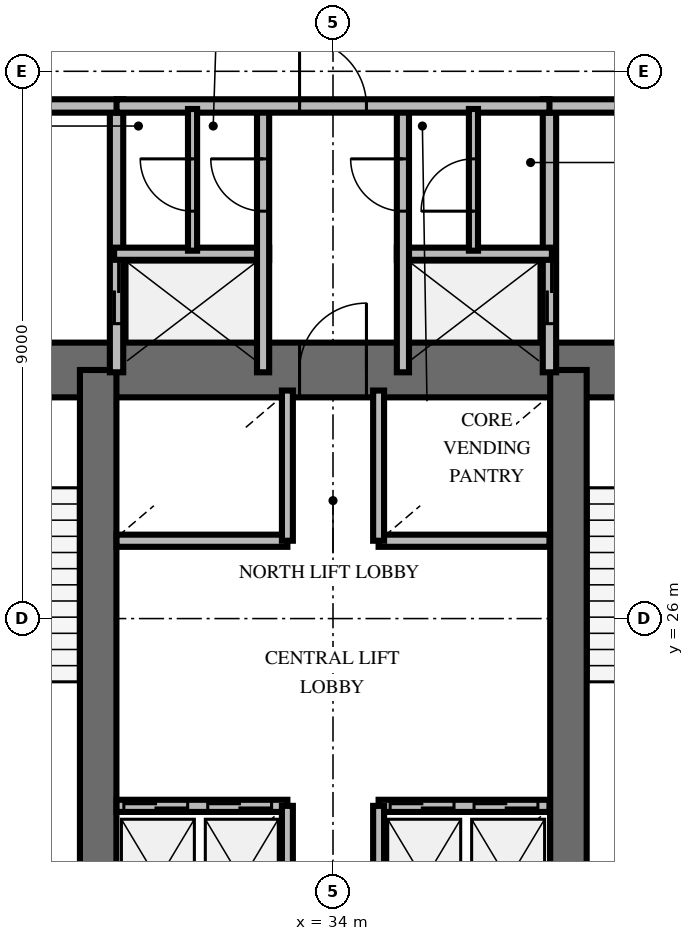
"""IFC4 building model, lengths in metres.
Left out: names, types, materials, properties, quantities, classifications, styles, units other than length and angle.
Written with IfcOpenShell. Run it as: python <this file> out.ifc"""

import sys

from ifc_helpers import new_model, si_unit, direction, frame, frame_2d, origin, place, context, subcontext, project, spatial, rectangle, extrude, element, fill, save


model = new_model("IFC4")
c1 = context("Model", 3, precision=1e-05, world=origin(), true_north=direction((0.0, 1.0)))
c2 = subcontext(c1, "Body", "Model", "MODEL_VIEW")
j1 = project(units=[si_unit("LENGTHUNIT", "METRE"), si_unit("PLANEANGLEUNIT", "RADIAN")], contexts=[c1])
p1 = place(None, origin())
s1 = spatial("IfcSite", under=j1, at=p1, CompositionType="ELEMENT")
p2 = place(p1, origin())
s2 = spatial("IfcBuilding", under=s1, at=p2, CompositionType="ELEMENT")
p3 = place(p2, frame((0.0, 0.0, 59.4)))
s3 = spatial("IfcBuildingStorey", under=s2, at=p3, CompositionType="ELEMENT", Elevation=59.4)
p4 = place(p3, frame((25.922, 30.088, 0.0), z_axis=(0.0, 0.0, 1.0), x_axis=(1.0, 0.0, 0.0)))
e1 = element("IfcWall", 1, at=p4, inside=s3, PredefinedType="SHEAR", context=c2, shape_type="SweptSolid", body=[
    extrude(rectangle(XDim=16.166, YDim=0.9, at=frame_2d((8.083, 0.0))), origin(), (0.0, 0.0, 1.0), 4.2),
])
p5 = place(p4, frame((1.028, 0.0, 0.0)))
e2 = element("IfcOpeningElement", 2, at=p5, cuts=e1, PredefinedType="OPENING", context=c2, shape_type="SweptSolid", body=[
    extrude(rectangle(XDim=1.05, YDim=2.15, at=frame_2d((0.525, 1.075))), frame((0.0, 0.46, 0.0), z_axis=(0.0, -1.0, 0.0), x_axis=(1.0, 0.0, 0.0)), (0.0, 0.0, 1.0), 0.92),
])
p6 = place(p4, frame((14.078, 0.0, 0.0)))
e3 = element("IfcOpeningElement", 3, at=p6, cuts=e1, PredefinedType="OPENING", context=c2, shape_type="SweptSolid", body=[
    extrude(rectangle(XDim=1.05, YDim=2.15, at=frame_2d((0.525, 1.075))), frame((0.0, 0.46, 0.0), z_axis=(0.0, -1.0, 0.0), x_axis=(1.0, 0.0, 0.0)), (0.0, 0.0, 1.0), 0.92),
])
p7 = place(p4, frame((7.528, 0.0, 0.0)))
e4 = element("IfcOpeningElement", 4, at=p7, cuts=e1, PredefinedType="OPENING", context=c2, shape_type="SweptSolid", body=[
    extrude(rectangle(XDim=1.1, YDim=2.15, at=frame_2d((0.55, 1.075))), frame((0.0, 0.46, 0.0), z_axis=(0.0, -1.0, 0.0), x_axis=(1.0, 0.0, 0.0)), (0.0, 0.0, 1.0), 0.92),
])
for number, where, z_axis, x_axis in (
    (5, (30.138, 20.112, 0.0), (0.0, 0.0, 1.0), (0.0, 1.0, 0.0)),
    (6, (37.872, 20.112, 0.0), (0.0, 0.0, 1.0), (0.0, 1.0, 0.0)),
):
    element("IfcWall", number, at=place(p3, frame(where, z_axis=z_axis, x_axis=x_axis)), inside=s3, PredefinedType="SHEAR", context=c2, shape_type="SweptSolid", body=[
        extrude(rectangle(XDim=9.976, YDim=0.6, at=frame_2d((4.988, 0.0))), origin(), (0.0, 0.0, 1.0), 4.2),
    ])
p8 = place(p3, frame((30.44, 30.05, 0.0), z_axis=(0.0, 0.0, 1.0), x_axis=(0.0, 1.0, 0.0)))
e7 = element("IfcWall", 7, at=p8, inside=s3, PredefinedType="SOLIDWALL", context=c2, shape_type="SweptSolid", body=[
    extrude(rectangle(XDim=4.38, YDim=0.22, at=frame_2d((2.19, 0.0))), origin(), (0.0, 0.0, 1.0), 3.0),
])
p9 = place(p8, frame((0.8, 0.0, 0.0)))
e8 = element("IfcOpeningElement", 8, at=p9, cuts=e7, PredefinedType="OPENING", context=c2, shape_type="SweptSolid", body=[
    extrude(rectangle(XDim=1.05, YDim=2.1, at=frame_2d((0.525, 1.05))), frame((0.0, 0.12, 0.0), z_axis=(0.0, -1.0, 0.0), x_axis=(1.0, 0.0, 0.0)), (0.0, 0.0, 1.0), 0.24),
])
p10 = place(p3, frame((26.24, 34.43, 0.0), z_axis=(0.0, 0.0, 1.0), x_axis=(1.0, 0.0, 0.0)))
e9 = element("IfcWall", 9, at=p10, inside=s3, PredefinedType="SOLIDWALL", context=c2, shape_type="SweptSolid", body=[
    extrude(rectangle(XDim=4.31, YDim=0.22, at=frame_2d((2.155, 0.0))), origin(), (0.0, 0.0, 1.0), 3.0),
])
p11 = place(p10, frame((1.6, 0.0, 0.0)))
e10 = element("IfcOpeningElement", 10, at=p11, cuts=e9, PredefinedType="OPENING", context=c2, shape_type="SweptSolid", body=[
    extrude(rectangle(XDim=1.1, YDim=2.15, at=frame_2d((0.55, 1.075))), frame((0.0, 0.12, 0.0), z_axis=(0.0, -1.0, 0.0), x_axis=(1.0, 0.0, 0.0)), (0.0, 0.0, 1.0), 0.24),
])
p12 = place(p3, frame((30.4, 32.0, 0.0), z_axis=(0.0, 0.0, 1.0), x_axis=(1.0, 0.0, 0.0)))
e11 = element("IfcWall", 11, at=p12, inside=s3, PredefinedType="SOLIDWALL", context=c2, shape_type="SweptSolid", body=[
    extrude(rectangle(XDim=2.55, YDim=0.2, at=frame_2d((1.275, 0.0))), origin(), (0.0, 0.0, 1.0), 3.0),
])
p13 = place(p3, frame((32.85, 30.05, 0.0), z_axis=(0.0, 0.0, 1.0), x_axis=(0.0, 1.0, 0.0)))
e12 = element("IfcWall", 12, at=p13, inside=s3, PredefinedType="SOLIDWALL", context=c2, shape_type="SweptSolid", body=[
    extrude(rectangle(XDim=4.38, YDim=0.2, at=frame_2d((2.19, 0.0))), origin(), (0.0, 0.0, 1.0), 3.0),
])
p14 = place(p13, frame((2.65, 0.0, 0.0)))
e13 = element("IfcOpeningElement", 13, at=p14, cuts=e12, PredefinedType="OPENING", context=c2, shape_type="SweptSolid", body=[
    extrude(rectangle(XDim=0.86, YDim=2.05, at=frame_2d((0.43, 1.025))), frame((0.0, 0.11, 0.0), z_axis=(0.0, -1.0, 0.0), x_axis=(1.0, 0.0, 0.0)), (0.0, 0.0, 1.0), 0.22),
])
p15 = place(p3, frame((37.56, 30.05, 0.0), z_axis=(0.0, 0.0, 1.0), x_axis=(0.0, 1.0, 0.0)))
e14 = element("IfcWall", 14, at=p15, inside=s3, PredefinedType="SOLIDWALL", context=c2, shape_type="SweptSolid", body=[
    extrude(rectangle(XDim=4.38, YDim=0.22, at=frame_2d((2.19, 0.0))), origin(), (0.0, 0.0, 1.0), 3.0),
])
p16 = place(p15, frame((0.8, 0.0, 0.0)))
e15 = element("IfcOpeningElement", 15, at=p16, cuts=e14, PredefinedType="OPENING", context=c2, shape_type="SweptSolid", body=[
    extrude(rectangle(XDim=1.05, YDim=2.1, at=frame_2d((0.525, 1.05))), frame((0.0, 0.12, 0.0), z_axis=(0.0, -1.0, 0.0), x_axis=(1.0, 0.0, 0.0)), (0.0, 0.0, 1.0), 0.24),
])
p17 = place(p3, frame((37.45, 34.43, 0.0), z_axis=(0.0, 0.0, 1.0), x_axis=(1.0, 0.0, 0.0)))
e16 = element("IfcWall", 16, at=p17, inside=s3, PredefinedType="SOLIDWALL", context=c2, shape_type="SweptSolid", body=[
    extrude(rectangle(XDim=4.31, YDim=0.22, at=frame_2d((2.155, 0.0))), origin(), (0.0, 0.0, 1.0), 3.0),
])
p18 = place(p17, frame((1.6, 0.0, 0.0)))
e17 = element("IfcOpeningElement", 17, at=p18, cuts=e16, PredefinedType="OPENING", context=c2, shape_type="SweptSolid", body=[
    extrude(rectangle(XDim=1.1, YDim=2.15, at=frame_2d((0.55, 1.075))), frame((0.0, 0.12, 0.0), z_axis=(0.0, -1.0, 0.0), x_axis=(1.0, 0.0, 0.0)), (0.0, 0.0, 1.0), 0.24),
])
p19 = place(p3, frame((35.05, 32.0, 0.0), z_axis=(0.0, 0.0, 1.0), x_axis=(1.0, 0.0, 0.0)))
e18 = element("IfcWall", 18, at=p19, inside=s3, PredefinedType="SOLIDWALL", context=c2, shape_type="SweptSolid", body=[
    extrude(rectangle(XDim=2.55, YDim=0.2, at=frame_2d((1.275, 0.0))), origin(), (0.0, 0.0, 1.0), 3.0),
])
p20 = place(p3, frame((35.15, 30.05, 0.0), z_axis=(0.0, 0.0, 1.0), x_axis=(0.0, 1.0, 0.0)))
e19 = element("IfcWall", 19, at=p20, inside=s3, PredefinedType="SOLIDWALL", context=c2, shape_type="SweptSolid", body=[
    extrude(rectangle(XDim=4.38, YDim=0.2, at=frame_2d((2.19, 0.0))), origin(), (0.0, 0.0, 1.0), 3.0),
])
p21 = place(p20, frame((2.65, 0.0, 0.0)))
e20 = element("IfcOpeningElement", 20, at=p21, cuts=e19, PredefinedType="OPENING", context=c2, shape_type="SweptSolid", body=[
    extrude(rectangle(XDim=0.86, YDim=2.05, at=frame_2d((0.43, 1.025))), frame((0.0, 0.11, 0.0), z_axis=(0.0, -1.0, 0.0), x_axis=(1.0, 0.0, 0.0)), (0.0, 0.0, 1.0), 0.22),
])
p22 = place(p3, frame((30.44, 34.43, 0.0), z_axis=(0.0, 0.0, 1.0), x_axis=(1.0, 0.0, 0.0)))
e21 = element("IfcWall", 21, at=p22, inside=s3, PredefinedType="SOLIDWALL", context=c2, shape_type="SweptSolid", body=[
    extrude(rectangle(XDim=7.12, YDim=0.22, at=frame_2d((3.56, 0.0))), origin(), (0.0, 0.0, 1.0), 3.0),
])
p23 = place(p22, frame((3.01, 0.0, 0.0)))
e22 = element("IfcOpeningElement", 22, at=p23, cuts=e21, PredefinedType="OPENING", context=c2, shape_type="SweptSolid", body=[
    extrude(rectangle(XDim=1.1, YDim=2.15, at=frame_2d((0.55, 1.075))), frame((0.0, 0.12, 0.0), z_axis=(0.0, -1.0, 0.0), x_axis=(1.0, 0.0, 0.0)), (0.0, 0.0, 1.0), 0.24),
])
p24 = place(p3, frame((31.69, 32.05, 0.0), z_axis=(0.0, 0.0, 1.0), x_axis=(0.0, 1.0, 0.0)))
e23 = element("IfcWall", 23, at=p24, inside=s3, PredefinedType="PARTITIONING", context=c2, shape_type="SweptSolid", body=[
    extrude(rectangle(XDim=2.33, YDim=0.15, at=frame_2d((1.165, 0.0))), origin(), (0.0, 0.0, 1.0), 3.0),
])
p25 = place(p24, frame((0.65, 0.0, 0.0)))
e24 = element("IfcOpeningElement", 24, at=p25, cuts=e23, PredefinedType="OPENING", context=c2, shape_type="SweptSolid", body=[
    extrude(rectangle(XDim=0.86, YDim=2.05, at=frame_2d((0.43, 1.025))), frame((0.0, 0.085, 0.0), z_axis=(0.0, -1.0, 0.0), x_axis=(1.0, 0.0, 0.0)), (0.0, 0.0, 1.0), 0.17),
])
p26 = place(p3, frame((36.31, 32.05, 0.0), z_axis=(0.0, 0.0, 1.0), x_axis=(0.0, 1.0, 0.0)))
e25 = element("IfcWall", 25, at=p26, inside=s3, PredefinedType="PARTITIONING", context=c2, shape_type="SweptSolid", body=[
    extrude(rectangle(XDim=2.33, YDim=0.15, at=frame_2d((1.165, 0.0))), origin(), (0.0, 0.0, 1.0), 3.0),
])
p27 = place(p26, frame((0.65, 0.0, 0.0)))
e26 = element("IfcOpeningElement", 26, at=p27, cuts=e25, PredefinedType="OPENING", context=c2, shape_type="SweptSolid", body=[
    extrude(rectangle(XDim=0.86, YDim=2.05, at=frame_2d((0.43, 1.025))), frame((0.0, 0.085, 0.0), z_axis=(0.0, -1.0, 0.0), x_axis=(1.0, 0.0, 0.0)), (0.0, 0.0, 1.0), 0.17),
])
p28 = place(p3, frame((30.44, 22.92, 0.0), z_axis=(0.0, 0.0, 1.0), x_axis=(1.0, 0.0, 0.0)))
e27 = element("IfcWall", 27, at=p28, inside=s3, PredefinedType="SOLIDWALL", context=c2, shape_type="SweptSolid", body=[
    extrude(rectangle(XDim=2.81, YDim=0.2, at=frame_2d((1.405, 0.0))), origin(), (0.0, 0.0, 1.0), 3.0),
])
p29 = place(p28, frame((0.12, 0.0, 0.0)))
e28 = element("IfcOpeningElement", 28, at=p29, cuts=e27, PredefinedType="OPENING", context=c2, shape_type="SweptSolid", body=[
    extrude(rectangle(XDim=1.05, YDim=2.1, at=frame_2d((0.525, 1.05))), frame((0.0, 0.11, 0.0), z_axis=(0.0, -1.0, 0.0), x_axis=(1.0, 0.0, 0.0)), (0.0, 0.0, 1.0), 0.22),
])
p30 = place(p28, frame((1.5, 0.0, 0.0)))
e29 = element("IfcOpeningElement", 29, at=p30, cuts=e27, PredefinedType="OPENING", context=c2, shape_type="SweptSolid", body=[
    extrude(rectangle(XDim=1.05, YDim=2.1, at=frame_2d((0.525, 1.05))), frame((0.0, 0.11, 0.0), z_axis=(0.0, -1.0, 0.0), x_axis=(1.0, 0.0, 0.0)), (0.0, 0.0, 1.0), 0.22),
])
p31 = place(p3, frame((33.25, 20.5, 0.0), z_axis=(0.0, 0.0, 1.0), x_axis=(0.0, 1.0, 0.0)))
e30 = element("IfcWall", 30, at=p31, inside=s3, PredefinedType="SOLIDWALL", context=c2, shape_type="SweptSolid", body=[
    extrude(rectangle(XDim=2.42, YDim=0.18, at=frame_2d((1.21, 0.0))), origin(), (0.0, 0.0, 1.0), 3.0),
])
p32 = place(p3, frame((34.75, 22.92, 0.0), z_axis=(0.0, 0.0, 1.0), x_axis=(1.0, 0.0, 0.0)))
e31 = element("IfcWall", 31, at=p32, inside=s3, PredefinedType="SOLIDWALL", context=c2, shape_type="SweptSolid", body=[
    extrude(rectangle(XDim=2.81, YDim=0.2, at=frame_2d((1.405, 0.0))), origin(), (0.0, 0.0, 1.0), 3.0),
])
p33 = place(p32, frame((0.19, 0.0, 0.0)))
e32 = element("IfcOpeningElement", 32, at=p33, cuts=e31, PredefinedType="OPENING", context=c2, shape_type="SweptSolid", body=[
    extrude(rectangle(XDim=1.05, YDim=2.1, at=frame_2d((0.525, 1.05))), frame((0.0, 0.11, 0.0), z_axis=(0.0, -1.0, 0.0), x_axis=(1.0, 0.0, 0.0)), (0.0, 0.0, 1.0), 0.22),
])
p34 = place(p32, frame((1.57, 0.0, 0.0)))
e33 = element("IfcOpeningElement", 33, at=p34, cuts=e31, PredefinedType="OPENING", context=c2, shape_type="SweptSolid", body=[
    extrude(rectangle(XDim=1.05, YDim=2.1, at=frame_2d((0.525, 1.05))), frame((0.0, 0.11, 0.0), z_axis=(0.0, -1.0, 0.0), x_axis=(1.0, 0.0, 0.0)), (0.0, 0.0, 1.0), 0.22),
])
p35 = place(p3, frame((34.75, 20.5, 0.0), z_axis=(0.0, 0.0, 1.0), x_axis=(0.0, 1.0, 0.0)))
e34 = element("IfcWall", 34, at=p35, inside=s3, PredefinedType="SOLIDWALL", context=c2, shape_type="SweptSolid", body=[
    extrude(rectangle(XDim=2.42, YDim=0.18, at=frame_2d((1.21, 0.0))), origin(), (0.0, 0.0, 1.0), 3.0),
])
p36 = place(p3, frame((30.44, 27.28, 0.0), z_axis=(0.0, 0.0, 1.0), x_axis=(1.0, 0.0, 0.0)))
e35 = element("IfcWall", 35, at=p36, inside=s3, PredefinedType="SOLIDWALL", context=c2, shape_type="SweptSolid", body=[
    extrude(rectangle(XDim=2.81, YDim=0.2, at=frame_2d((1.405, 0.0))), origin(), (0.0, 0.0, 1.0), 3.0),
])
p37 = place(p3, frame((33.25, 27.28, 0.0), z_axis=(0.0, 0.0, 1.0), x_axis=(0.0, 1.0, 0.0)))
e36 = element("IfcWall", 36, at=p37, inside=s3, PredefinedType="SOLIDWALL", context=c2, shape_type="SweptSolid", body=[
    extrude(rectangle(XDim=2.47, YDim=0.18, at=frame_2d((1.235, 0.0))), origin(), (0.0, 0.0, 1.0), 3.0),
])
p38 = place(p3, frame((34.75, 27.28, 0.0), z_axis=(0.0, 0.0, 1.0), x_axis=(1.0, 0.0, 0.0)))
e37 = element("IfcWall", 37, at=p38, inside=s3, PredefinedType="SOLIDWALL", context=c2, shape_type="SweptSolid", body=[
    extrude(rectangle(XDim=2.81, YDim=0.2, at=frame_2d((1.405, 0.0))), origin(), (0.0, 0.0, 1.0), 3.0),
])
p39 = place(p3, frame((34.75, 27.28, 0.0), z_axis=(0.0, 0.0, 1.0), x_axis=(0.0, 1.0, 0.0)))
e38 = element("IfcWall", 38, at=p39, inside=s3, PredefinedType="SOLIDWALL", context=c2, shape_type="SweptSolid", body=[
    extrude(rectangle(XDim=2.47, YDim=0.18, at=frame_2d((1.235, 0.0))), origin(), (0.0, 0.0, 1.0), 3.0),
])
p40 = place(p7, origin())
e39 = element("IfcDoor", 39, at=p40, inside=s3, OperationType="SINGLE_SWING_RIGHT", PredefinedType="DOOR", context=c2, shape_type="SweptSolid", body=[
    extrude(rectangle(XDim=1.1, YDim=2.15, at=frame_2d((0.55, 1.075))), frame((0.0, 0.025, 0.0), z_axis=(0.0, -1.0, 0.0), x_axis=(1.0, 0.0, 0.0)), (0.0, 0.0, 1.0), 0.05),
])
fill(e4, e39)
p41 = place(p9, origin())
e40 = element("IfcDoor", 40, at=p41, inside=s3, OperationType="DOUBLE_DOOR_SLIDING", PredefinedType="USERDEFINED", context=c2, shape_type="SweptSolid", body=[
    extrude(rectangle(XDim=1.05, YDim=2.1, at=frame_2d((0.525, 1.05))), frame((0.0, 0.025, 0.0), z_axis=(0.0, -1.0, 0.0), x_axis=(1.0, 0.0, 0.0)), (0.0, 0.0, 1.0), 0.05),
])
fill(e8, e40)
p42 = place(p14, origin())
e41 = element("IfcDoor", 41, at=p42, inside=s3, OperationType="SINGLE_SWING_RIGHT", PredefinedType="TRAPDOOR", context=c2, shape_type="SweptSolid", body=[
    extrude(rectangle(XDim=0.86, YDim=2.05, at=frame_2d((0.43, 1.025))), frame((0.0, 0.025, 0.0), z_axis=(0.0, -1.0, 0.0), x_axis=(1.0, 0.0, 0.0)), (0.0, 0.0, 1.0), 0.05),
])
fill(e13, e41)
p43 = place(p16, origin())
e42 = element("IfcDoor", 42, at=p43, inside=s3, OperationType="DOUBLE_DOOR_SLIDING", PredefinedType="USERDEFINED", context=c2, shape_type="SweptSolid", body=[
    extrude(rectangle(XDim=1.05, YDim=2.1, at=frame_2d((0.525, 1.05))), frame((0.0, 0.025, 0.0), z_axis=(0.0, -1.0, 0.0), x_axis=(1.0, 0.0, 0.0)), (0.0, 0.0, 1.0), 0.05),
])
fill(e15, e42)
p44 = place(p21, origin())
e43 = element("IfcDoor", 43, at=p44, inside=s3, OperationType="SINGLE_SWING_RIGHT", PredefinedType="TRAPDOOR", context=c2, shape_type="SweptSolid", body=[
    extrude(rectangle(XDim=0.86, YDim=2.05, at=frame_2d((0.43, 1.025))), frame((0.0, 0.025, 0.0), z_axis=(0.0, -1.0, 0.0), x_axis=(1.0, 0.0, 0.0)), (0.0, 0.0, 1.0), 0.05),
])
fill(e20, e43)
p45 = place(p23, origin())
e44 = element("IfcDoor", 44, at=p45, inside=s3, OperationType="SINGLE_SWING_LEFT", PredefinedType="DOOR", context=c2, shape_type="SweptSolid", body=[
    extrude(rectangle(XDim=1.1, YDim=2.15, at=frame_2d((0.55, 1.075))), frame((0.0, 0.025, 0.0), z_axis=(0.0, -1.0, 0.0), x_axis=(1.0, 0.0, 0.0)), (0.0, 0.0, 1.0), 0.05),
])
fill(e22, e44)
p46 = place(p25, origin())
e45 = element("IfcDoor", 45, at=p46, inside=s3, OperationType="SINGLE_SWING_RIGHT", PredefinedType="TRAPDOOR", context=c2, shape_type="SweptSolid", body=[
    extrude(rectangle(XDim=0.86, YDim=2.05, at=frame_2d((0.43, 1.025))), frame((0.0, 0.025, 0.0), z_axis=(0.0, -1.0, 0.0), x_axis=(1.0, 0.0, 0.0)), (0.0, 0.0, 1.0), 0.05),
])
fill(e24, e45)
p47 = place(p27, origin())
e46 = element("IfcDoor", 46, at=p47, inside=s3, OperationType="SINGLE_SWING_LEFT", PredefinedType="TRAPDOOR", context=c2, shape_type="SweptSolid", body=[
    extrude(rectangle(XDim=0.86, YDim=2.05, at=frame_2d((0.43, 1.025))), frame((0.0, 0.025, 0.0), z_axis=(0.0, -1.0, 0.0), x_axis=(1.0, 0.0, 0.0)), (0.0, 0.0, 1.0), 0.05),
])
fill(e26, e46)
p48 = place(p29, origin())
e47 = element("IfcDoor", 47, at=p48, inside=s3, OperationType="DOUBLE_DOOR_SLIDING", PredefinedType="USERDEFINED", context=c2, shape_type="SweptSolid", body=[
    extrude(rectangle(XDim=1.05, YDim=2.1, at=frame_2d((0.525, 1.05))), frame((0.0, 0.025, 0.0), z_axis=(0.0, -1.0, 0.0), x_axis=(1.0, 0.0, 0.0)), (0.0, 0.0, 1.0), 0.05),
])
fill(e28, e47)
p49 = place(p30, origin())
e48 = element("IfcDoor", 48, at=p49, inside=s3, OperationType="DOUBLE_DOOR_SLIDING", PredefinedType="USERDEFINED", context=c2, shape_type="SweptSolid", body=[
    extrude(rectangle(XDim=1.05, YDim=2.1, at=frame_2d((0.525, 1.05))), frame((0.0, 0.025, 0.0), z_axis=(0.0, -1.0, 0.0), x_axis=(1.0, 0.0, 0.0)), (0.0, 0.0, 1.0), 0.05),
])
fill(e29, e48)
p50 = place(p33, origin())
e49 = element("IfcDoor", 49, at=p50, inside=s3, OperationType="DOUBLE_DOOR_SLIDING", PredefinedType="USERDEFINED", context=c2, shape_type="SweptSolid", body=[
    extrude(rectangle(XDim=1.05, YDim=2.1, at=frame_2d((0.525, 1.05))), frame((0.0, 0.025, 0.0), z_axis=(0.0, -1.0, 0.0), x_axis=(1.0, 0.0, 0.0)), (0.0, 0.0, 1.0), 0.05),
])
fill(e32, e49)
p51 = place(p34, origin())
e50 = element("IfcDoor", 50, at=p51, inside=s3, OperationType="DOUBLE_DOOR_SLIDING", PredefinedType="USERDEFINED", context=c2, shape_type="SweptSolid", body=[
    extrude(rectangle(XDim=1.05, YDim=2.1, at=frame_2d((0.525, 1.05))), frame((0.0, 0.025, 0.0), z_axis=(0.0, -1.0, 0.0), x_axis=(1.0, 0.0, 0.0)), (0.0, 0.0, 1.0), 0.05),
])
fill(e33, e50)
save(model, sys.argv[1])
